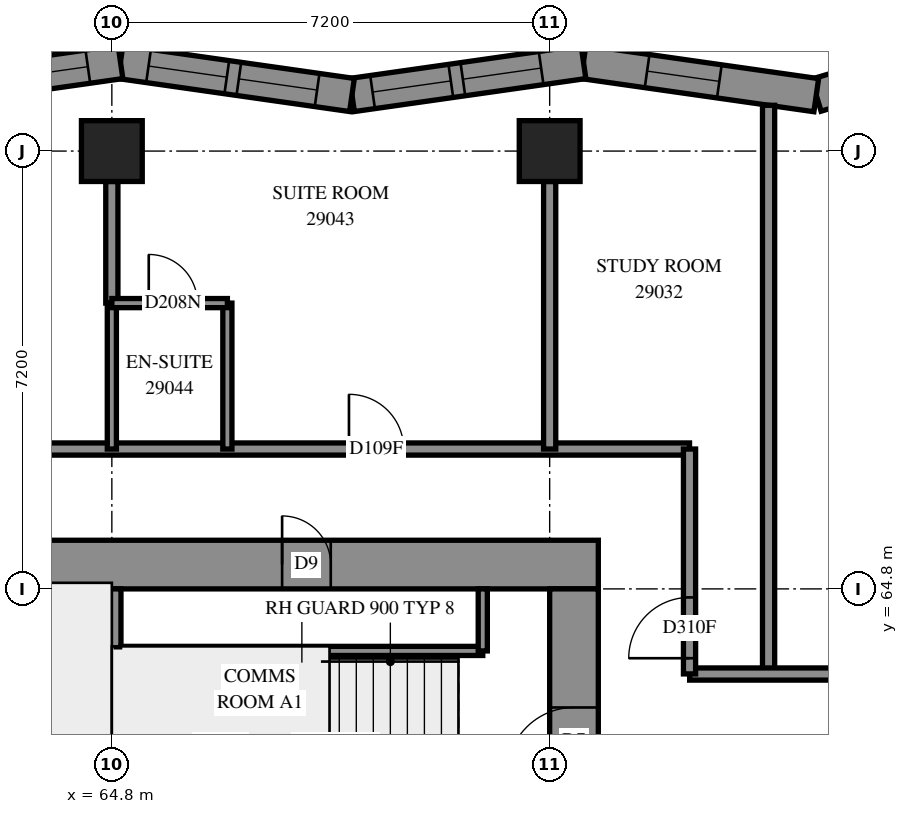
"""IFC4 building model, lengths in metres.
Left out: names, types, materials, properties, quantities, classifications, styles, units other than length and angle.
Written with IfcOpenShell. Run it as: python <this file> out.ifc"""

import sys

from ifc_helpers import new_model, si_unit, direction, frame, frame_2d, origin, origin_2d, place, context, subcontext, project, spatial, polyline, rectangle, outline, extrude, element, fill, save


model = new_model("IFC4")
c1 = context("Model", 3, precision=1e-05, world=origin(), true_north=direction((0.0, 1.0)))
c2 = subcontext(c1, "Body", "Model", "MODEL_VIEW")
j1 = project(units=[si_unit("LENGTHUNIT", "METRE"), si_unit("PLANEANGLEUNIT", "RADIAN")], contexts=[c1])
p1 = place(None, origin())
s1 = spatial("IfcSite", under=j1, at=p1, CompositionType="ELEMENT")
p2 = place(p1, origin())
s2 = spatial("IfcBuilding", under=s1, at=p2, CompositionType="ELEMENT")
p3 = place(p2, frame((0.0, 0.0, 108.4)))
s3 = spatial("IfcBuildingStorey", under=s2, at=p3, CompositionType="ELEMENT", Elevation=108.4)
for number, where, z_axis, x_axis in (
    (1, (64.8, 72.0, 0.0), (0.0, 0.0, 1.0), (1.0, 0.0, 0.0)),
    (2, (72.0, 72.0, 0.0), (0.0, 0.0, 1.0), (1.0, 0.0, 0.0)),
):
    element("IfcColumn", number, at=place(p3, frame(where, z_axis=z_axis, x_axis=x_axis)), inside=s3, PredefinedType="COLUMN", context=c2, shape_type="SweptSolid", body=[
        extrude(rectangle(XDim=1.0, YDim=1.0, at=origin_2d()), origin(), (0.0, 0.0, 1.0), 3.1),
    ])
p4 = place(p3, frame((56.8, 65.2, -0.3), z_axis=(0.0, 0.0, 1.0), x_axis=(1.0, 0.0, 0.0)))
e3 = element("IfcWall", 3, at=p4, inside=s3, PredefinedType="SHEAR", context=c2, shape_type="SweptSolid", body=[
    extrude(rectangle(XDim=16.0, YDim=0.8, at=frame_2d((8.0, 0.0))), origin(), (0.0, 0.0, 1.0), 2.7),
])
p5 = place(p4, frame((10.8, 0.0, 0.3)))
e4 = element("IfcOpeningElement", 4, at=p5, cuts=e3, PredefinedType="OPENING", context=c2, shape_type="SweptSolid", body=[
    extrude(rectangle(XDim=0.8, YDim=2.1, at=frame_2d((0.4, 1.05))), frame((0.0, 0.41, 0.0), z_axis=(0.0, -1.0, 0.0), x_axis=(1.0, 0.0, 0.0)), (0.0, 0.0, 1.0), 0.82),
])
p6 = place(p3, frame((72.4, 50.4, -0.3), z_axis=(0.0, 0.0, 1.0), x_axis=(0.0, 1.0, 0.0)))
e5 = element("IfcWall", 5, at=p6, inside=s3, PredefinedType="SHEAR", context=c2, shape_type="SweptSolid", body=[
    extrude(rectangle(XDim=14.4, YDim=0.8, at=frame_2d((7.2, 0.0))), origin(), (0.0, 0.0, 1.0), 2.7),
])
p7 = place(p6, frame((4.55, 0.0, 0.3)))
e6 = element("IfcOpeningElement", 6, at=p7, cuts=e5, PredefinedType="OPENING", context=c2, shape_type="SweptSolid", body=[
    extrude(rectangle(XDim=1.1, YDim=2.1, at=frame_2d((0.55, 1.05))), frame((0.0, 0.41, 0.0), z_axis=(0.0, -1.0, 0.0), x_axis=(1.0, 0.0, 0.0)), (0.0, 0.0, 1.0), 0.82),
])
p8 = place(p6, frame((11.35, 0.0, 0.3)))
e7 = element("IfcOpeningElement", 7, at=p8, cuts=e5, PredefinedType="OPENING", context=c2, shape_type="SweptSolid", body=[
    extrude(rectangle(XDim=1.1, YDim=2.1, at=frame_2d((0.55, 1.05))), frame((0.0, 0.41, 0.0), z_axis=(0.0, -1.0, 0.0), x_axis=(1.0, 0.0, 0.0)), (0.0, 0.0, 1.0), 0.82),
])
p9 = place(p3, frame((64.8, 60.6, 0.0), z_axis=(0.0, 0.0, 1.0), x_axis=(0.0, 1.0, 0.0)))
e8 = element("IfcWall", 8, at=p9, inside=s3, PredefinedType="SOLIDWALL", context=c2, shape_type="SweptSolid", body=[
    extrude(rectangle(XDim=4.2, YDim=0.3, at=frame_2d((2.1, 0.0))), origin(), (0.0, 0.0, 1.0), 3.1),
])
p10 = place(p3, frame((80.027, 74.012, 0.0), z_axis=(0.0, 0.0, 1.0), x_axis=(-0.9578284561, -0.2873406493, 0.0)))
e9 = element("IfcWall", 9, at=p10, inside=s3, PredefinedType="SOLIDWALL", context=c2, shape_type="SweptSolid", body=[
    extrude(outline(polyline([(-0.232, -0.275), (3.743, -0.275), (3.864, 0.275), (0.232, 0.275), (-0.232, -0.275)])), origin(), (0.0, 0.0, 1.0), 3.1),
])
p11 = place(p10, frame((1.634, 0.0, 0.5)))
e10 = element("IfcOpeningElement", 10, at=p11, cuts=e9, PredefinedType="OPENING", context=c2, shape_type="SweptSolid", body=[
    extrude(rectangle(XDim=1.2, YDim=2.45, at=frame_2d((0.6, 1.225))), frame((0.0, 0.285, 0.0), z_axis=(0.0, -1.0, 0.0), x_axis=(1.0, 0.0, 0.0)), (0.0, 0.0, 1.0), 0.57),
])
p12 = place(p3, frame((76.384, 72.919, 0.0), z_axis=(0.0, 0.0, 1.0), x_axis=(-0.9900171381, 0.1409470338, 0.0)))
e11 = element("IfcWall", 11, at=p12, inside=s3, PredefinedType="SOLIDWALL", context=c2, shape_type="SweptSolid", body=[
    extrude(outline(polyline([(0.06, -0.275), (3.906, -0.275), (3.828, 0.275), (-0.06, 0.275), (0.06, -0.275)])), origin(), (0.0, 0.0, 1.0), 3.1),
])
p13 = place(p12, frame((1.61, 0.0, 0.5)))
e12 = element("IfcOpeningElement", 12, at=p13, cuts=e11, PredefinedType="OPENING", context=c2, shape_type="SweptSolid", body=[
    extrude(rectangle(XDim=1.2, YDim=2.45, at=frame_2d((0.6, 1.225))), frame((0.0, 0.285, 0.0), z_axis=(0.0, -1.0, 0.0), x_axis=(1.0, 0.0, 0.0)), (0.0, 0.0, 1.0), 0.57),
])
p14 = place(p3, frame((72.556, 73.464, 0.0), z_axis=(0.0, 0.0, 1.0), x_axis=(-0.990016994, -0.1409480459, 0.0)))
e13 = element("IfcWall", 13, at=p14, inside=s3, PredefinedType="SOLIDWALL", context=c2, shape_type="SweptSolid", body=[
    extrude(outline(polyline([(-0.039, -0.275), (3.806, -0.275), (3.885, 0.275), (0.039, 0.275), (-0.039, -0.275)])), origin(), (0.0, 0.0, 1.0), 3.1),
])
p15 = place(p14, frame((0.704, 0.0, 0.5)))
e14 = element("IfcOpeningElement", 14, at=p15, cuts=e13, PredefinedType="OPENING", context=c2, shape_type="SweptSolid", body=[
    extrude(rectangle(XDim=1.3, YDim=2.45, at=frame_2d((0.65, 1.225))), frame((0.0, 0.285, 0.0), z_axis=(0.0, -1.0, 0.0), x_axis=(1.0, 0.0, 0.0)), (0.0, 0.0, 1.0), 0.57),
])
p16 = place(p14, frame((2.204, 0.0, 0.5)))
e15 = element("IfcOpeningElement", 15, at=p16, cuts=e13, PredefinedType="OPENING", context=c2, shape_type="SweptSolid", body=[
    extrude(rectangle(XDim=1.3, YDim=2.45, at=frame_2d((0.65, 1.225))), frame((0.0, 0.285, 0.0), z_axis=(0.0, -1.0, 0.0), x_axis=(1.0, 0.0, 0.0)), (0.0, 0.0, 1.0), 0.57),
])
p17 = place(p3, frame((68.749, 72.922, 0.0), z_axis=(0.0, 0.0, 1.0), x_axis=(-0.990016994, 0.1409480459, 0.0)))
e16 = element("IfcWall", 16, at=p17, inside=s3, PredefinedType="SOLIDWALL", context=c2, shape_type="SweptSolid", body=[
    extrude(outline(polyline([(0.039, -0.275), (3.885, -0.275), (3.806, 0.275), (-0.039, 0.275), (0.039, -0.275)])), origin(), (0.0, 0.0, 1.0), 3.1),
])
p18 = place(p17, frame((0.579, 0.0, 0.5)))
e17 = element("IfcOpeningElement", 17, at=p18, cuts=e16, PredefinedType="OPENING", context=c2, shape_type="SweptSolid", body=[
    extrude(rectangle(XDim=1.3, YDim=2.45, at=frame_2d((0.65, 1.225))), frame((0.0, 0.285, 0.0), z_axis=(0.0, -1.0, 0.0), x_axis=(1.0, 0.0, 0.0)), (0.0, 0.0, 1.0), 0.57),
])
p19 = place(p17, frame((2.079, 0.0, 0.5)))
e18 = element("IfcOpeningElement", 18, at=p19, cuts=e16, PredefinedType="OPENING", context=c2, shape_type="SweptSolid", body=[
    extrude(rectangle(XDim=1.3, YDim=2.45, at=frame_2d((0.65, 1.225))), frame((0.0, 0.285, 0.0), z_axis=(0.0, -1.0, 0.0), x_axis=(1.0, 0.0, 0.0)), (0.0, 0.0, 1.0), 0.57),
])
p20 = place(p3, frame((64.942, 73.464, 0.0), z_axis=(0.0, 0.0, 1.0), x_axis=(-0.990016994, -0.1409480459, 0.0)))
e19 = element("IfcWall", 19, at=p20, inside=s3, PredefinedType="SOLIDWALL", context=c2, shape_type="SweptSolid", body=[
    extrude(outline(polyline([(-0.039, -0.275), (3.806, -0.275), (3.885, 0.275), (0.039, 0.275), (-0.039, -0.275)])), origin(), (0.0, 0.0, 1.0), 3.1),
])
p21 = place(p20, frame((0.542, 0.0, 0.5)))
e20 = element("IfcOpeningElement", 20, at=p21, cuts=e19, PredefinedType="OPENING", context=c2, shape_type="SweptSolid", body=[
    extrude(rectangle(XDim=1.3, YDim=2.45, at=frame_2d((0.65, 1.225))), frame((0.0, 0.285, 0.0), z_axis=(0.0, -1.0, 0.0), x_axis=(1.0, 0.0, 0.0)), (0.0, 0.0, 1.0), 0.57),
])
p22 = place(p20, frame((2.042, 0.0, 0.5)))
e21 = element("IfcOpeningElement", 21, at=p22, cuts=e19, PredefinedType="OPENING", context=c2, shape_type="SweptSolid", body=[
    extrude(rectangle(XDim=1.3, YDim=2.45, at=frame_2d((0.65, 1.225))), frame((0.0, 0.285, 0.0), z_axis=(0.0, -1.0, 0.0), x_axis=(1.0, 0.0, 0.0)), (0.0, 0.0, 1.0), 0.57),
])
p23 = place(p3, frame((64.95, 63.78, 0.0), z_axis=(0.0, 0.0, 1.0), x_axis=(1.0, 0.0, 0.0)))
e22 = element("IfcWall", 22, at=p23, inside=s3, PredefinedType="PARTITIONING", context=c2, shape_type="SweptSolid", body=[
    extrude(rectangle(XDim=5.95, YDim=0.15, at=frame_2d((2.975, 0.0))), origin(), (0.0, 0.0, 1.0), 3.1),
])
p24 = place(p3, frame((70.9, 63.78, 0.0), z_axis=(0.0, 0.0, 1.0), x_axis=(0.0, 1.0, 0.0)))
e23 = element("IfcWall", 23, at=p24, inside=s3, PredefinedType="PARTITIONING", context=c2, shape_type="SweptSolid", body=[
    extrude(rectangle(XDim=1.02, YDim=0.15, at=frame_2d((0.51, 0.0))), origin(), (0.0, 0.0, 1.0), 3.1),
])
p25 = place(p3, frame((55.3, 67.1, 0.0), z_axis=(0.0, 0.0, 1.0), x_axis=(1.0, 0.0, 0.0)))
e24 = element("IfcWall", 24, at=p25, inside=s3, PredefinedType="PARTITIONING", context=c2, shape_type="SweptSolid", body=[
    extrude(rectangle(XDim=19.0, YDim=0.2, at=frame_2d((9.5, 0.0))), origin(), (0.0, 0.0, 1.0), 3.1),
])
p26 = place(p25, frame((6.199, 0.0, 0.0)))
e25 = element("IfcOpeningElement", 25, at=p26, cuts=e24, PredefinedType="OPENING", context=c2, shape_type="SweptSolid", body=[
    extrude(rectangle(XDim=0.9, YDim=2.1, at=frame_2d((0.45, 1.05))), frame((0.0, 0.11, 0.0), z_axis=(0.0, -1.0, 0.0), x_axis=(1.0, 0.0, 0.0)), (0.0, 0.0, 1.0), 0.22),
])
p27 = place(p25, frame((13.399, 0.0, 0.0)))
e26 = element("IfcOpeningElement", 26, at=p27, cuts=e24, PredefinedType="OPENING", context=c2, shape_type="SweptSolid", body=[
    extrude(rectangle(XDim=0.9, YDim=2.1, at=frame_2d((0.45, 1.05))), frame((0.0, 0.11, 0.0), z_axis=(0.0, -1.0, 0.0), x_axis=(1.0, 0.0, 0.0)), (0.0, 0.0, 1.0), 0.22),
])
p28 = place(p3, frame((75.6, 63.4, 0.0), z_axis=(0.0, 0.0, 1.0), x_axis=(0.0, 1.0, 0.0)))
e27 = element("IfcWall", 27, at=p28, inside=s3, PredefinedType="PARTITIONING", context=c2, shape_type="SweptSolid", body=[
    extrude(rectangle(XDim=9.353, YDim=0.2, at=frame_2d((4.676, 0.0))), origin(), (0.0, 0.0, 1.0), 3.1),
])
p29 = place(p3, frame((74.302, 63.4, 0.0), z_axis=(0.0, 0.0, 1.0), x_axis=(1.0, 0.0, 0.0)))
e28 = element("IfcWall", 28, at=p29, inside=s3, PredefinedType="PARTITIONING", context=c2, shape_type="SweptSolid", body=[
    extrude(rectangle(XDim=4.896, YDim=0.2, at=frame_2d((2.448, 0.0))), origin(), (0.0, 0.0, 1.0), 3.1),
])
p30 = place(p3, frame((72.0, 67.1, 0.0), z_axis=(0.0, 0.0, 1.0), x_axis=(0.0, 1.0, 0.0)))
e29 = element("IfcWall", 29, at=p30, inside=s3, PredefinedType="PARTITIONING", context=c2, shape_type="SweptSolid", body=[
    extrude(rectangle(XDim=4.4, YDim=0.2, at=frame_2d((2.2, 0.0))), origin(), (0.0, 0.0, 1.0), 3.1),
])
p31 = place(p3, frame((74.3, 63.402, 0.0), z_axis=(0.0, 0.0, 1.0), x_axis=(0.0, 1.0, 0.0)))
e30 = element("IfcWall", 30, at=p31, inside=s3, PredefinedType="PARTITIONING", context=c2, shape_type="SweptSolid", body=[
    extrude(rectangle(XDim=3.698, YDim=0.2, at=frame_2d((1.849, 0.0))), origin(), (0.0, 0.0, 1.0), 3.1),
])
p32 = place(p31, frame((0.258, 0.0, 0.0)))
e31 = element("IfcOpeningElement", 31, at=p32, cuts=e30, PredefinedType="OPENING", context=c2, shape_type="SweptSolid", body=[
    extrude(rectangle(XDim=1.0, YDim=2.1, at=frame_2d((0.5, 1.05))), frame((0.0, 0.11, 0.0), z_axis=(0.0, -1.0, 0.0), x_axis=(1.0, 0.0, 0.0)), (0.0, 0.0, 1.0), 0.22),
])
for number, where, z_axis, x_axis in (
    (32, (64.8, 67.1, 0.0), (0.0, 0.0, 1.0), (0.0, 1.0, 0.0)),
    (33, (66.7, 67.1, 0.0), (0.0, 0.0, 1.0), (0.0, 1.0, 0.0)),
):
    element("IfcWall", number, at=place(p3, frame(where, z_axis=z_axis, x_axis=x_axis)), inside=s3, PredefinedType="PARTITIONING", context=c2, shape_type="SweptSolid", body=[
        extrude(rectangle(XDim=2.4, YDim=0.15, at=frame_2d((1.2, 0.0))), origin(), (0.0, 0.0, 1.0), 3.1),
    ])
p33 = place(p3, frame((64.8, 69.5, 0.0), z_axis=(0.0, 0.0, 1.0), x_axis=(0.0, 1.0, 0.0)))
e34 = element("IfcWall", 34, at=p33, inside=s3, PredefinedType="PARTITIONING", context=c2, shape_type="SweptSolid", body=[
    extrude(rectangle(XDim=2.0, YDim=0.2, at=frame_2d((1.0, 0.0))), origin(), (0.0, 0.0, 1.0), 3.1),
])
p34 = place(p3, frame((64.8, 69.5, 0.0), z_axis=(0.0, 0.0, 1.0), x_axis=(1.0, 0.0, 0.0)))
e35 = element("IfcWall", 35, at=p34, inside=s3, PredefinedType="PARTITIONING", context=c2, shape_type="SweptSolid", body=[
    extrude(rectangle(XDim=1.9, YDim=0.15, at=frame_2d((0.95, 0.0))), origin(), (0.0, 0.0, 1.0), 3.1),
])
p35 = place(p34, frame((0.607, 0.0, 0.0)))
e36 = element("IfcOpeningElement", 36, at=p35, cuts=e35, PredefinedType="OPENING", context=c2, shape_type="SweptSolid", body=[
    extrude(rectangle(XDim=0.8, YDim=2.1, at=frame_2d((0.4, 1.05))), frame((0.0, 0.085, 0.0), z_axis=(0.0, -1.0, 0.0), x_axis=(1.0, 0.0, 0.0)), (0.0, 0.0, 1.0), 0.17),
])
p36 = place(p13, origin())
e37 = element("IfcWindow", 37, at=p36, inside=s3, PartitioningType="SINGLE_PANEL", PredefinedType="WINDOW", context=c2, shape_type="SweptSolid", body=[
    extrude(rectangle(XDim=1.2, YDim=2.45, at=frame_2d((0.6, 1.225))), frame((0.0, 0.155, 0.0), z_axis=(0.0, -1.0, 0.0), x_axis=(1.0, 0.0, 0.0)), (0.0, 0.0, 1.0), 0.06),
])
fill(e12, e37)
p37 = place(p15, origin())
e38 = element("IfcWindow", 38, at=p37, inside=s3, PartitioningType="SINGLE_PANEL", PredefinedType="WINDOW", context=c2, shape_type="SweptSolid", body=[
    extrude(rectangle(XDim=1.3, YDim=2.45, at=frame_2d((0.65, 1.225))), frame((0.0, 0.155, 0.0), z_axis=(0.0, -1.0, 0.0), x_axis=(1.0, 0.0, 0.0)), (0.0, 0.0, 1.0), 0.06),
])
fill(e14, e38)
p38 = place(p16, origin())
e39 = element("IfcWindow", 39, at=p38, inside=s3, PartitioningType="SINGLE_PANEL", PredefinedType="WINDOW", context=c2, shape_type="SweptSolid", body=[
    extrude(rectangle(XDim=1.3, YDim=2.45, at=frame_2d((0.65, 1.225))), frame((0.0, 0.155, 0.0), z_axis=(0.0, -1.0, 0.0), x_axis=(1.0, 0.0, 0.0)), (0.0, 0.0, 1.0), 0.06),
])
fill(e15, e39)
p39 = place(p18, origin())
e40 = element("IfcWindow", 40, at=p39, inside=s3, PartitioningType="SINGLE_PANEL", PredefinedType="WINDOW", context=c2, shape_type="SweptSolid", body=[
    extrude(rectangle(XDim=1.3, YDim=2.45, at=frame_2d((0.65, 1.225))), frame((0.0, 0.155, 0.0), z_axis=(0.0, -1.0, 0.0), x_axis=(1.0, 0.0, 0.0)), (0.0, 0.0, 1.0), 0.06),
])
fill(e17, e40)
p40 = place(p19, origin())
e41 = element("IfcWindow", 41, at=p40, inside=s3, PartitioningType="SINGLE_PANEL", PredefinedType="WINDOW", context=c2, shape_type="SweptSolid", body=[
    extrude(rectangle(XDim=1.3, YDim=2.45, at=frame_2d((0.65, 1.225))), frame((0.0, 0.155, 0.0), z_axis=(0.0, -1.0, 0.0), x_axis=(1.0, 0.0, 0.0)), (0.0, 0.0, 1.0), 0.06),
])
fill(e18, e41)
p41 = place(p21, origin())
e42 = element("IfcWindow", 42, at=p41, inside=s3, PartitioningType="SINGLE_PANEL", PredefinedType="WINDOW", context=c2, shape_type="SweptSolid", body=[
    extrude(rectangle(XDim=1.3, YDim=2.45, at=frame_2d((0.65, 1.225))), frame((0.0, 0.155, 0.0), z_axis=(0.0, -1.0, 0.0), x_axis=(1.0, 0.0, 0.0)), (0.0, 0.0, 1.0), 0.06),
])
fill(e20, e42)
p42 = place(p5, origin())
e43 = element("IfcDoor", 43, at=p42, inside=s3, OperationType="SINGLE_SWING_RIGHT", PredefinedType="DOOR", context=c2, shape_type="SweptSolid", body=[
    extrude(rectangle(XDim=0.8, YDim=2.1, at=frame_2d((0.4, 1.05))), frame((0.0, -0.34, 0.0), z_axis=(0.0, -1.0, 0.0), x_axis=(1.0, 0.0, 0.0)), (0.0, 0.0, 1.0), 0.05),
])
fill(e4, e43)
p43 = place(p8, origin())
e44 = element("IfcDoor", 44, at=p43, inside=s3, OperationType="SINGLE_SWING_RIGHT", PredefinedType="DOOR", context=c2, shape_type="SweptSolid", body=[
    extrude(rectangle(XDim=1.1, YDim=2.1, at=frame_2d((0.55, 1.05))), frame((0.0, 0.025, 0.0), z_axis=(0.0, -1.0, 0.0), x_axis=(1.0, 0.0, 0.0)), (0.0, 0.0, 1.0), 0.05),
])
fill(e7, e44)
p44 = place(p32, origin())
e45 = element("IfcDoor", 45, at=p44, inside=s3, OperationType="SINGLE_SWING_RIGHT", PredefinedType="DOOR", context=c2, shape_type="SweptSolid", body=[
    extrude(rectangle(XDim=1.0, YDim=2.1, at=frame_2d((0.5, 1.05))), frame((0.0, 0.025, 0.0), z_axis=(0.0, -1.0, 0.0), x_axis=(1.0, 0.0, 0.0)), (0.0, 0.0, 1.0), 0.05),
])
fill(e31, e45)
p45 = place(p27, origin())
e46 = element("IfcDoor", 46, at=p45, inside=s3, OperationType="SINGLE_SWING_RIGHT", PredefinedType="DOOR", context=c2, shape_type="SweptSolid", body=[
    extrude(rectangle(XDim=0.9, YDim=2.1, at=frame_2d((0.45, 1.05))), frame((0.0, 0.025, 0.0), z_axis=(0.0, -1.0, 0.0), x_axis=(1.0, 0.0, 0.0)), (0.0, 0.0, 1.0), 0.05),
])
fill(e26, e46)
p46 = place(p35, origin())
e47 = element("IfcDoor", 47, at=p46, inside=s3, OperationType="SINGLE_SWING_RIGHT", PredefinedType="DOOR", context=c2, shape_type="SweptSolid", body=[
    extrude(rectangle(XDim=0.8, YDim=2.1, at=frame_2d((0.4, 1.05))), frame((0.0, 0.025, 0.0), z_axis=(0.0, -1.0, 0.0), x_axis=(1.0, 0.0, 0.0)), (0.0, 0.0, 1.0), 0.05),
])
fill(e36, e47)
save(model, sys.argv[1])
